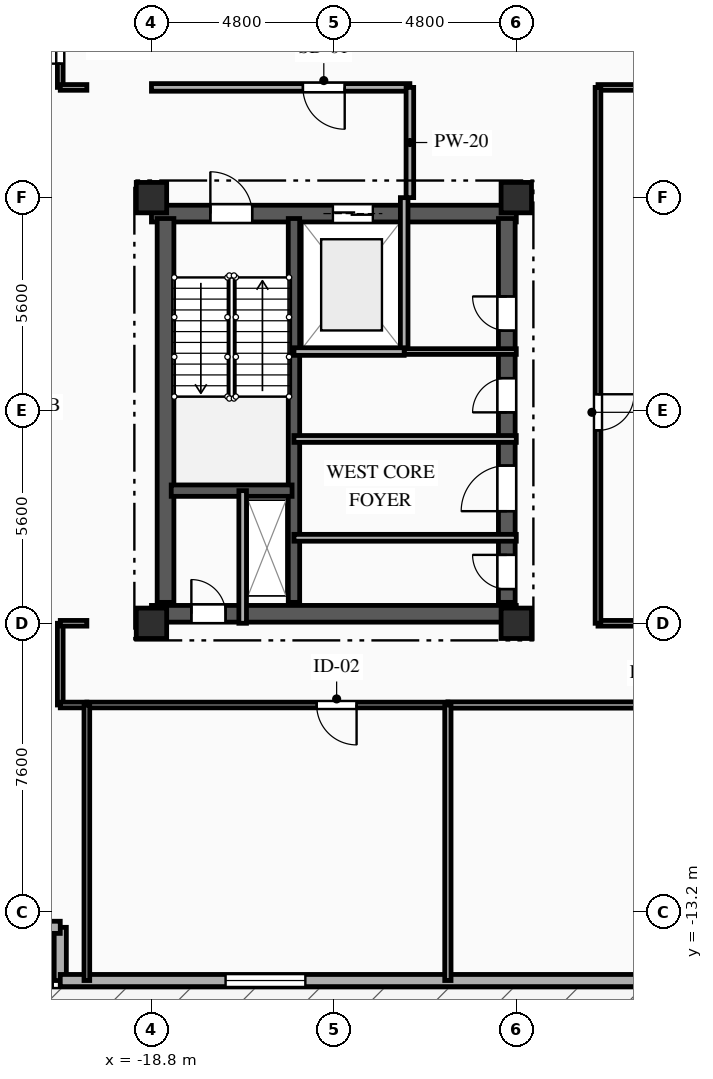
"""IFC4 building model, lengths in metres.
Left out: names, types, materials, properties, quantities, classifications, styles, units other than length and angle.
Written with IfcOpenShell. Run it as: python <this file> out.ifc"""

import sys

from ifc_helpers import new_model, si_unit, direction, frame, frame_2d, origin, origin_2d, place, context, subcontext, project, spatial, rectangle, extrude, element, fill, save


model = new_model("IFC4")
c1 = context("Model", 3, precision=1e-05, world=origin(), true_north=direction((0.0, 1.0)))
c2 = subcontext(c1, "Body", "Model", "MODEL_VIEW")
j1 = project(units=[si_unit("LENGTHUNIT", "METRE"), si_unit("PLANEANGLEUNIT", "RADIAN")], contexts=[c1])
p1 = place(None, origin())
s1 = spatial("IfcSite", under=j1, at=p1, CompositionType="ELEMENT")
p2 = place(p1, origin())
s2 = spatial("IfcBuilding", under=s1, at=p2, CompositionType="ELEMENT")
p3 = place(p2, frame((0.0, 0.0, 261.8)))
s3 = spatial("IfcBuildingStorey", under=s2, at=p3, CompositionType="ELEMENT", Elevation=261.8)
for number, where, z_axis, x_axis in (
    (1, (-18.8, -5.6, 0.0), (0.0, 0.0, 1.0), (1.0, 0.0, 0.0)),
    (2, (-18.8, 5.6, 0.0), (0.0, 0.0, 1.0), (1.0, 0.0, 0.0)),
    (3, (-9.2, -5.6, 0.0), (0.0, 0.0, 1.0), (1.0, 0.0, 0.0)),
    (4, (-9.2, 5.6, 0.0), (0.0, 0.0, 1.0), (1.0, 0.0, 0.0)),
):
    element("IfcColumn", number, at=place(p3, frame(where, z_axis=z_axis, x_axis=x_axis)), inside=s3, PredefinedType="COLUMN", context=c2, shape_type="SweptSolid", body=[
        extrude(rectangle(XDim=0.8, YDim=0.8, at=origin_2d()), origin(), (0.0, 0.0, 1.0), 4.2),
    ])
p4 = place(p3, frame((-21.2, -15.0, 0.0), z_axis=(0.0, 0.0, 1.0), x_axis=(0.0, 1.0, 0.0)))
e5 = element("IfcWall", 5, at=p4, inside=s3, PredefinedType="SOLIDWALL", context=c2, shape_type="SweptSolid", body=[
    extrude(rectangle(XDim=1.4, YDim=0.32, at=frame_2d((0.7, 0.0))), origin(), (0.0, 0.0, 1.0), 3.78),
])
p5 = place(p3, frame((-21.2, -13.6, 0.0), z_axis=(0.0, 0.0, 1.0), x_axis=(-1.0, 0.0, 0.0)))
e6 = element("IfcWall", 6, at=p5, inside=s3, PredefinedType="SOLIDWALL", context=c2, shape_type="SweptSolid", body=[
    extrude(rectangle(XDim=1.4, YDim=0.32, at=frame_2d((0.7, 0.0))), origin(), (0.0, 0.0, 1.0), 3.78),
])
p6 = place(p3, frame((20.8, -15.0, 0.0), z_axis=(0.0, 0.0, 1.0), x_axis=(-1.0, 0.0, 0.0)))
e7 = element("IfcWall", 7, at=p6, inside=s3, PredefinedType="SOLIDWALL", context=c2, shape_type="SweptSolid", body=[
    extrude(rectangle(XDim=42.0, YDim=0.32, at=frame_2d((21.0, 0.0))), origin(), (0.0, 0.0, 1.0), 3.78),
])
p7 = place(p6, frame((0.75, 0.0, 0.0)))
e8 = element("IfcOpeningElement", 8, at=p7, cuts=e7, PredefinedType="OPENING", context=c2, shape_type="SweptSolid", body=[
    extrude(rectangle(XDim=1.5, YDim=2.2, at=frame_2d((0.75, 1.1))), frame((0.0, 0.17, 0.0), z_axis=(0.0, -1.0, 0.0), x_axis=(1.0, 0.0, 0.0)), (0.0, 0.0, 1.0), 0.34),
])
p8 = place(p6, frame((4.11, 0.0, 0.75)))
e9 = element("IfcOpeningElement", 9, at=p8, cuts=e7, PredefinedType="OPENING", context=c2, shape_type="SweptSolid", body=[
    extrude(rectangle(XDim=2.1, YDim=2.3, at=frame_2d((1.05, 1.15))), frame((0.0, 0.17, 0.0), z_axis=(0.0, -1.0, 0.0), x_axis=(1.0, 0.0, 0.0)), (0.0, 0.0, 1.0), 0.34),
])
p9 = place(p6, frame((19.79, 0.0, 0.75)))
e10 = element("IfcOpeningElement", 10, at=p9, cuts=e7, PredefinedType="OPENING", context=c2, shape_type="SweptSolid", body=[
    extrude(rectangle(XDim=2.1, YDim=2.3, at=frame_2d((1.05, 1.15))), frame((0.0, 0.17, 0.0), z_axis=(0.0, -1.0, 0.0), x_axis=(1.0, 0.0, 0.0)), (0.0, 0.0, 1.0), 0.34),
])
p10 = place(p6, frame((35.55, 0.0, 0.75)))
e11 = element("IfcOpeningElement", 11, at=p10, cuts=e7, PredefinedType="OPENING", context=c2, shape_type="SweptSolid", body=[
    extrude(rectangle(XDim=2.1, YDim=2.3, at=frame_2d((1.05, 1.15))), frame((0.0, 0.17, 0.0), z_axis=(0.0, -1.0, 0.0), x_axis=(1.0, 0.0, 0.0)), (0.0, 0.0, 1.0), 0.34),
])
p11 = place(p3, frame((-18.8, 5.18, 0.0), z_axis=(0.0, 0.0, 1.0), x_axis=(1.0, 0.0, 0.0)))
e12 = element("IfcWall", 12, at=p11, inside=s3, PredefinedType="SHEAR", context=c2, shape_type="SweptSolid", body=[
    extrude(rectangle(XDim=9.6, YDim=0.44, at=frame_2d((4.8, 0.0))), origin(), (0.0, 0.0, 1.0), 3.78),
])
p12 = place(p11, frame((1.55, 0.0, 0.0)))
e13 = element("IfcOpeningElement", 13, at=p12, cuts=e12, PredefinedType="OPENING", context=c2, shape_type="SweptSolid", body=[
    extrude(rectangle(XDim=1.1, YDim=2.15, at=frame_2d((0.55, 1.075))), frame((0.0, 0.23, 0.0), z_axis=(0.0, -1.0, 0.0), x_axis=(1.0, 0.0, 0.0)), (0.0, 0.0, 1.0), 0.46),
])
p13 = place(p11, frame((4.775, 0.0, 0.0)))
e14 = element("IfcOpeningElement", 14, at=p13, cuts=e12, PredefinedType="OPENING", context=c2, shape_type="SweptSolid", body=[
    extrude(rectangle(XDim=1.05, YDim=2.1, at=frame_2d((0.525, 1.05))), frame((0.0, 0.23, 0.0), z_axis=(0.0, -1.0, 0.0), x_axis=(1.0, 0.0, 0.0)), (0.0, 0.0, 1.0), 0.46),
])
p14 = place(p3, frame((-18.8, -5.35, 0.0), z_axis=(0.0, 0.0, 1.0), x_axis=(1.0, 0.0, 0.0)))
e15 = element("IfcWall", 15, at=p14, inside=s3, PredefinedType="SHEAR", context=c2, shape_type="SweptSolid", body=[
    extrude(rectangle(XDim=9.6, YDim=0.44, at=frame_2d((4.8, 0.0))), origin(), (0.0, 0.0, 1.0), 3.78),
])
p15 = place(p14, frame((1.05, 0.0, 0.0)))
e16 = element("IfcOpeningElement", 16, at=p15, cuts=e15, PredefinedType="OPENING", context=c2, shape_type="SweptSolid", body=[
    extrude(rectangle(XDim=0.9, YDim=2.1, at=frame_2d((0.45, 1.05))), frame((0.0, 0.23, 0.0), z_axis=(0.0, -1.0, 0.0), x_axis=(1.0, 0.0, 0.0)), (0.0, 0.0, 1.0), 0.46),
])
p16 = place(p3, frame((-18.43, -5.05, 0.0), z_axis=(0.0, 0.0, 1.0), x_axis=(0.0, 1.0, 0.0)))
e17 = element("IfcWall", 17, at=p16, inside=s3, PredefinedType="SHEAR", context=c2, shape_type="SweptSolid", body=[
    extrude(rectangle(XDim=10.1, YDim=0.44, at=frame_2d((5.05, 0.0))), origin(), (0.0, 0.0, 1.0), 3.78),
])
p17 = place(p3, frame((-9.45, -5.05, 0.0), z_axis=(0.0, 0.0, 1.0), x_axis=(0.0, 1.0, 0.0)))
e18 = element("IfcWall", 18, at=p17, inside=s3, PredefinedType="SHEAR", context=c2, shape_type="SweptSolid", body=[
    extrude(rectangle(XDim=10.1, YDim=0.44, at=frame_2d((5.05, 0.0))), origin(), (0.0, 0.0, 1.0), 3.78),
])
p18 = place(p17, frame((7.15, 0.0, 0.0)))
e19 = element("IfcOpeningElement", 19, at=p18, cuts=e18, PredefinedType="OPENING", context=c2, shape_type="SweptSolid", body=[
    extrude(rectangle(XDim=0.9, YDim=2.1, at=frame_2d((0.45, 1.05))), frame((0.0, 0.23, 0.0), z_axis=(0.0, -1.0, 0.0), x_axis=(1.0, 0.0, 0.0)), (0.0, 0.0, 1.0), 0.46),
])
p19 = place(p17, frame((2.4, 0.0, 0.0)))
e20 = element("IfcOpeningElement", 20, at=p19, cuts=e18, PredefinedType="OPENING", context=c2, shape_type="SweptSolid", body=[
    extrude(rectangle(XDim=1.2, YDim=2.15, at=frame_2d((0.6, 1.075))), frame((0.0, 0.23, 0.0), z_axis=(0.0, -1.0, 0.0), x_axis=(1.0, 0.0, 0.0)), (0.0, 0.0, 1.0), 0.46),
])
p20 = place(p17, frame((0.35, 0.0, 0.0)))
e21 = element("IfcOpeningElement", 21, at=p20, cuts=e18, PredefinedType="OPENING", context=c2, shape_type="SweptSolid", body=[
    extrude(rectangle(XDim=0.9, YDim=2.1, at=frame_2d((0.45, 1.05))), frame((0.0, 0.23, 0.0), z_axis=(0.0, -1.0, 0.0), x_axis=(1.0, 0.0, 0.0)), (0.0, 0.0, 1.0), 0.46),
])
p21 = place(p17, frame((5.0, 0.0, 0.0)))
e22 = element("IfcOpeningElement", 22, at=p21, cuts=e18, PredefinedType="OPENING", context=c2, shape_type="SweptSolid", body=[
    extrude(rectangle(XDim=0.9, YDim=2.1, at=frame_2d((0.45, 1.05))), frame((0.0, 0.23, 0.0), z_axis=(0.0, -1.0, 0.0), x_axis=(1.0, 0.0, 0.0)), (0.0, 0.0, 1.0), 0.46),
])
p22 = place(p3, frame((-15.05, -5.05, 0.0), z_axis=(0.0, 0.0, 1.0), x_axis=(0.0, 1.0, 0.0)))
e23 = element("IfcWall", 23, at=p22, inside=s3, PredefinedType="SHEAR", context=c2, shape_type="SweptSolid", body=[
    extrude(rectangle(XDim=10.1, YDim=0.3, at=frame_2d((5.05, 0.0))), origin(), (0.0, 0.0, 1.0), 3.78),
])
p23 = place(p3, frame((-18.28, -2.11, 0.0), z_axis=(0.0, 0.0, 1.0), x_axis=(1.0, 0.0, 0.0)))
e24 = element("IfcWall", 24, at=p23, inside=s3, PredefinedType="SHEAR", context=c2, shape_type="SweptSolid", body=[
    extrude(rectangle(XDim=3.18, YDim=0.3, at=frame_2d((1.59, 0.0))), origin(), (0.0, 0.0, 1.0), 3.78),
])
p24 = place(p3, frame((-16.4, -5.6, 0.0), z_axis=(0.0, 0.0, 1.0), x_axis=(0.0, 1.0, 0.0)))
e25 = element("IfcWall", 25, at=p24, inside=s3, PredefinedType="PARTITIONING", context=c2, shape_type="SweptSolid", body=[
    extrude(rectangle(XDim=3.49, YDim=0.2, at=frame_2d((1.745, 0.0))), origin(), (0.0, 0.0, 1.0), 3.78),
])
p25 = place(p3, frame((-12.15, 1.55, 0.0), z_axis=(0.0, 0.0, 1.0), x_axis=(0.0, 1.0, 0.0)))
e26 = element("IfcWall", 26, at=p25, inside=s3, PredefinedType="PARTITIONING", context=c2, shape_type="SweptSolid", body=[
    extrude(rectangle(XDim=4.05, YDim=0.2, at=frame_2d((2.025, 0.0))), origin(), (0.0, 0.0, 1.0), 3.78),
])
p26 = place(p3, frame((-12.0, 8.5, 0.0), z_axis=(0.0, 0.0, 1.0), x_axis=(-1.0, 0.0, 0.0)))
e27 = element("IfcWall", 27, at=p26, inside=s3, PredefinedType="PARTITIONING", context=c2, shape_type="SweptSolid", body=[
    extrude(rectangle(XDim=6.8, YDim=0.2, at=frame_2d((3.4, 0.0))), origin(), (0.0, 0.0, 1.0), 3.78),
])
p27 = place(p26, frame((1.715, 0.0, 0.0)))
e28 = element("IfcOpeningElement", 28, at=p27, cuts=e27, PredefinedType="OPENING", context=c2, shape_type="SweptSolid", body=[
    extrude(rectangle(XDim=1.1, YDim=2.15, at=frame_2d((0.55, 1.075))), frame((0.0, 0.11, 0.0), z_axis=(0.0, -1.0, 0.0), x_axis=(1.0, 0.0, 0.0)), (0.0, 0.0, 1.0), 0.22),
])
p28 = place(p3, frame((-12.0, 5.6, 0.0), z_axis=(0.0, 0.0, 1.0), x_axis=(0.0, 1.0, 0.0)))
e29 = element("IfcWall", 29, at=p28, inside=s3, PredefinedType="PARTITIONING", context=c2, shape_type="SweptSolid", body=[
    extrude(rectangle(XDim=2.9, YDim=0.2, at=frame_2d((1.45, 0.0))), origin(), (0.0, 0.0, 1.0), 3.78),
])
p29 = place(p3, frame((-12.15, 1.55, 0.0), z_axis=(0.0, 0.0, 1.0), x_axis=(1.0, 0.0, 0.0)))
e30 = element("IfcWall", 30, at=p29, inside=s3, PredefinedType="PARTITIONING", context=c2, shape_type="SweptSolid", body=[
    extrude(rectangle(XDim=2.95, YDim=0.15, at=frame_2d((1.475, 0.0))), origin(), (0.0, 0.0, 1.0), 3.78),
])
p30 = place(p3, frame((-15.05, -3.35, 0.0), z_axis=(0.0, 0.0, 1.0), x_axis=(1.0, 0.0, 0.0)))
e31 = element("IfcWall", 31, at=p30, inside=s3, PredefinedType="PARTITIONING", context=c2, shape_type="SweptSolid", body=[
    extrude(rectangle(XDim=5.85, YDim=0.18, at=frame_2d((2.925, 0.0))), origin(), (0.0, 0.0, 1.0), 3.495),
])
p31 = place(p3, frame((-9.2, -0.75, 0.0), z_axis=(0.0, 0.0, 1.0), x_axis=(-1.0, 0.0, 0.0)))
e32 = element("IfcWall", 32, at=p31, inside=s3, PredefinedType="PARTITIONING", context=c2, shape_type="SweptSolid", body=[
    extrude(rectangle(XDim=5.85, YDim=0.18, at=frame_2d((2.925, 0.0))), origin(), (0.0, 0.0, 1.0), 3.78),
])
p32 = place(p3, frame((-21.2, 8.5, 0.0), z_axis=(0.0, 0.0, 1.0), x_axis=(0.0, 1.0, 0.0)))
e33 = element("IfcWall", 33, at=p32, inside=s3, PredefinedType="PARTITIONING", context=c2, shape_type="SweptSolid", body=[
    extrude(rectangle(XDim=2.15, YDim=0.15, at=frame_2d((1.075, 0.0))), origin(), (0.0, 0.0, 1.0), 3.435),
])
p33 = place(p32, frame((0.625, 0.0, 0.0)))
e34 = element("IfcOpeningElement", 34, at=p33, cuts=e33, PredefinedType="OPENING", context=c2, shape_type="SweptSolid", body=[
    extrude(rectangle(XDim=0.9, YDim=2.1, at=frame_2d((0.45, 1.05))), frame((0.0, 0.085, 0.0), z_axis=(0.0, -1.0, 0.0), x_axis=(1.0, 0.0, 0.0)), (0.0, 0.0, 1.0), 0.17),
])
p34 = place(p3, frame((-20.5, 8.5, 0.0), z_axis=(0.0, 0.0, 1.0), x_axis=(-1.0, 0.0, 0.0)))
e35 = element("IfcWall", 35, at=p34, inside=s3, PredefinedType="PARTITIONING", context=c2, shape_type="SweptSolid", body=[
    extrude(rectangle(XDim=0.7, YDim=0.15, at=frame_2d((0.35, 0.0))), origin(), (0.0, 0.0, 1.0), 3.78),
])
p35 = place(p3, frame((0.0, 8.5, 0.0), z_axis=(0.0, 0.0, 1.0), x_axis=(-1.0, 0.0, 0.0)))
e36 = element("IfcWall", 36, at=p35, inside=s3, PredefinedType="PARTITIONING", context=c2, shape_type="SweptSolid", body=[
    extrude(rectangle(XDim=7.05, YDim=0.15, at=frame_2d((3.525, 0.0))), origin(), (0.0, 0.0, 1.0), 3.78),
])
p36 = place(p3, frame((0.0, -7.75, 0.0), z_axis=(0.0, 0.0, 1.0), x_axis=(-1.0, 0.0, 0.0)))
e37 = element("IfcWall", 37, at=p36, inside=s3, PredefinedType="PARTITIONING", context=c2, shape_type="SweptSolid", body=[
    extrude(rectangle(XDim=11.0, YDim=0.165, at=frame_2d((5.5, 0.0))), origin(), (0.0, 0.0, 1.0), 3.78),
])
p37 = place(p36, frame((1.679, 0.0, 0.0)))
e38 = element("IfcOpeningElement", 38, at=p37, cuts=e37, PredefinedType="OPENING", context=c2, shape_type="SweptSolid", body=[
    extrude(rectangle(XDim=1.05, YDim=2.15, at=frame_2d((0.525, 1.075))), frame((0.0, 0.093, 0.0), z_axis=(0.0, -1.0, 0.0), x_axis=(1.0, 0.0, 0.0)), (0.0, 0.0, 1.0), 0.185),
])
p38 = place(p3, frame((-11.0, -7.75, 0.0), z_axis=(0.0, 0.0, 1.0), x_axis=(-1.0, 0.0, 0.0)))
e39 = element("IfcWall", 39, at=p38, inside=s3, PredefinedType="PARTITIONING", context=c2, shape_type="SweptSolid", body=[
    extrude(rectangle(XDim=9.5, YDim=0.15, at=frame_2d((4.75, 0.0))), origin(), (0.0, 0.0, 1.0), 3.78),
])
p39 = place(p38, frame((2.403, 0.0, 0.0)))
e40 = element("IfcOpeningElement", 40, at=p39, cuts=e39, PredefinedType="OPENING", context=c2, shape_type="SweptSolid", body=[
    extrude(rectangle(XDim=1.05, YDim=2.15, at=frame_2d((0.525, 1.075))), frame((0.0, 0.085, 0.0), z_axis=(0.0, -1.0, 0.0), x_axis=(1.0, 0.0, 0.0)), (0.0, 0.0, 1.0), 0.17),
])
p40 = place(p3, frame((-21.2, -7.75, 0.0), z_axis=(0.0, 0.0, 1.0), x_axis=(0.0, 1.0, 0.0)))
e41 = element("IfcWall", 41, at=p40, inside=s3, PredefinedType="PARTITIONING", context=c2, shape_type="SweptSolid", body=[
    extrude(rectangle(XDim=2.15, YDim=0.15, at=frame_2d((1.075, 0.0))), origin(), (0.0, 0.0, 1.0), 3.435),
])
for number, where, z_axis, x_axis in (
    (42, (-20.5, -7.75, 0.0), (0.0, 0.0, 1.0), (-1.0, 0.0, 0.0)),
    (43, (-21.2, -5.6, 0.0), (0.0, 0.0, 1.0), (1.0, 0.0, 0.0)),
):
    element("IfcWall", number, at=place(p3, frame(where, z_axis=z_axis, x_axis=x_axis)), inside=s3, PredefinedType="PARTITIONING", context=c2, shape_type="SweptSolid", body=[
        extrude(rectangle(XDim=0.7, YDim=0.15, at=frame_2d((0.35, 0.0))), origin(), (0.0, 0.0, 1.0), 3.78),
    ])
p41 = place(p3, frame((-7.05, -5.6, 0.0), z_axis=(0.0, 0.0, 1.0), x_axis=(1.0, 0.0, 0.0)))
e44 = element("IfcWall", 44, at=p41, inside=s3, PredefinedType="PARTITIONING", context=c2, shape_type="SweptSolid", body=[
    extrude(rectangle(XDim=7.05, YDim=0.15, at=frame_2d((3.525, 0.0))), origin(), (0.0, 0.0, 1.0), 3.265),
])
p42 = place(p3, frame((-7.05, 8.5, 0.0), z_axis=(0.0, 0.0, 1.0), x_axis=(0.0, -1.0, 0.0)))
e45 = element("IfcWall", 45, at=p42, inside=s3, PredefinedType="PARTITIONING", context=c2, shape_type="SweptSolid", body=[
    extrude(rectangle(XDim=14.1, YDim=0.15, at=frame_2d((7.05, 0.0))), origin(), (0.0, 0.0, 1.0), 3.78),
])
p43 = place(p42, frame((8.074, 0.0, 0.0)))
e46 = element("IfcOpeningElement", 46, at=p43, cuts=e45, PredefinedType="OPENING", context=c2, shape_type="SweptSolid", body=[
    extrude(rectangle(XDim=0.95, YDim=2.1, at=frame_2d((0.475, 1.05))), frame((0.0, 0.085, 0.0), z_axis=(0.0, -1.0, 0.0), x_axis=(1.0, 0.0, 0.0)), (0.0, 0.0, 1.0), 0.17),
])
p44 = place(p3, frame((-11.0, -15.0, 0.0), z_axis=(0.0, 0.0, 1.0), x_axis=(0.0, 1.0, 0.0)))
e47 = element("IfcWall", 47, at=p44, inside=s3, PredefinedType="PARTITIONING", context=c2, shape_type="SweptSolid", body=[
    extrude(rectangle(XDim=7.25, YDim=0.165, at=frame_2d((3.625, 0.0))), origin(), (0.0, 0.0, 1.0), 3.78),
])
p45 = place(p3, frame((-20.5, -15.0, 0.0), z_axis=(0.0, 0.0, 1.0), x_axis=(0.0, 1.0, 0.0)))
e48 = element("IfcWall", 48, at=p45, inside=s3, PredefinedType="PARTITIONING", context=c2, shape_type="SweptSolid", body=[
    extrude(rectangle(XDim=7.25, YDim=0.15, at=frame_2d((3.625, 0.0))), origin(), (0.0, 0.0, 1.0), 3.78),
])
p46 = place(p3, frame((-15.05, 1.55, 0.0), z_axis=(0.0, 0.0, 1.0), x_axis=(1.0, 0.0, 0.0)))
e49 = element("IfcWall", 49, at=p46, inside=s3, PredefinedType="PARTITIONING", context=c2, shape_type="SweptSolid", body=[
    extrude(rectangle(XDim=2.9, YDim=0.2, at=frame_2d((1.45, 0.0))), origin(), (0.0, 0.0, 1.0), 3.78),
])
p47 = place(p10, origin())
e50 = element("IfcWindow", 50, at=p47, inside=s3, PartitioningType="SINGLE_PANEL", PredefinedType="WINDOW", context=c2, shape_type="SweptSolid", body=[
    extrude(rectangle(XDim=2.1, YDim=2.3, at=frame_2d((1.05, 1.15))), frame((0.0, 0.03, 0.0), z_axis=(0.0, -1.0, 0.0), x_axis=(1.0, 0.0, 0.0)), (0.0, 0.0, 1.0), 0.06),
])
fill(e11, e50)
p48 = place(p12, origin())
e51 = element("IfcDoor", 51, at=p48, inside=s3, OperationType="SINGLE_SWING_LEFT", PredefinedType="DOOR", context=c2, shape_type="SweptSolid", body=[
    extrude(rectangle(XDim=1.1, YDim=2.15, at=frame_2d((0.55, 1.075))), frame((0.0, 0.025, 0.0), z_axis=(0.0, -1.0, 0.0), x_axis=(1.0, 0.0, 0.0)), (0.0, 0.0, 1.0), 0.05),
])
fill(e13, e51)
p49 = place(p13, origin())
e52 = element("IfcDoor", 52, at=p49, inside=s3, OperationType="DOUBLE_DOOR_SLIDING", PredefinedType="DOOR", context=c2, shape_type="SweptSolid", body=[
    extrude(rectangle(XDim=1.05, YDim=2.1, at=frame_2d((0.525, 1.05))), frame((0.0, 0.025, 0.0), z_axis=(0.0, -1.0, 0.0), x_axis=(1.0, 0.0, 0.0)), (0.0, 0.0, 1.0), 0.05),
])
fill(e14, e52)
p50 = place(p15, origin())
e53 = element("IfcDoor", 53, at=p50, inside=s3, OperationType="SINGLE_SWING_LEFT", PredefinedType="DOOR", context=c2, shape_type="SweptSolid", body=[
    extrude(rectangle(XDim=0.9, YDim=2.1, at=frame_2d((0.45, 1.05))), frame((0.0, 0.025, 0.0), z_axis=(0.0, -1.0, 0.0), x_axis=(1.0, 0.0, 0.0)), (0.0, 0.0, 1.0), 0.05),
])
fill(e16, e53)
p51 = place(p27, origin())
e54 = element("IfcDoor", 54, at=p51, inside=s3, OperationType="SINGLE_SWING_LEFT", PredefinedType="DOOR", context=c2, shape_type="SweptSolid", body=[
    extrude(rectangle(XDim=1.1, YDim=2.15, at=frame_2d((0.55, 1.075))), frame((0.0, 0.025, 0.0), z_axis=(0.0, -1.0, 0.0), x_axis=(1.0, 0.0, 0.0)), (0.0, 0.0, 1.0), 0.05),
])
fill(e28, e54)
p52 = place(p18, origin())
e55 = element("IfcDoor", 55, at=p52, inside=s3, OperationType="SINGLE_SWING_RIGHT", PredefinedType="DOOR", context=c2, shape_type="SweptSolid", body=[
    extrude(rectangle(XDim=0.9, YDim=2.1, at=frame_2d((0.45, 1.05))), frame((0.0, 0.025, 0.0), z_axis=(0.0, -1.0, 0.0), x_axis=(1.0, 0.0, 0.0)), (0.0, 0.0, 1.0), 0.05),
])
fill(e19, e55)
p53 = place(p19, origin())
e56 = element("IfcDoor", 56, at=p53, inside=s3, OperationType="SINGLE_SWING_LEFT", PredefinedType="DOOR", context=c2, shape_type="SweptSolid", body=[
    extrude(rectangle(XDim=1.2, YDim=2.15, at=frame_2d((0.6, 1.075))), frame((0.0, 0.025, 0.0), z_axis=(0.0, -1.0, 0.0), x_axis=(1.0, 0.0, 0.0)), (0.0, 0.0, 1.0), 0.05),
])
fill(e20, e56)
p54 = place(p20, origin())
e57 = element("IfcDoor", 57, at=p54, inside=s3, OperationType="SINGLE_SWING_RIGHT", PredefinedType="DOOR", context=c2, shape_type="SweptSolid", body=[
    extrude(rectangle(XDim=0.9, YDim=2.1, at=frame_2d((0.45, 1.05))), frame((0.0, 0.025, 0.0), z_axis=(0.0, -1.0, 0.0), x_axis=(1.0, 0.0, 0.0)), (0.0, 0.0, 1.0), 0.05),
])
fill(e21, e57)
p55 = place(p21, origin())
e58 = element("IfcDoor", 58, at=p55, inside=s3, OperationType="SINGLE_SWING_LEFT", PredefinedType="DOOR", context=c2, shape_type="SweptSolid", body=[
    extrude(rectangle(XDim=0.9, YDim=2.1, at=frame_2d((0.45, 1.05))), frame((0.0, 0.025, 0.0), z_axis=(0.0, -1.0, 0.0), x_axis=(1.0, 0.0, 0.0)), (0.0, 0.0, 1.0), 0.05),
])
fill(e22, e58)
p56 = place(p33, origin())
e59 = element("IfcDoor", 59, at=p56, inside=s3, OperationType="SINGLE_SWING_LEFT", PredefinedType="DOOR", context=c2, shape_type="SweptSolid", body=[
    extrude(rectangle(XDim=0.9, YDim=2.1, at=frame_2d((0.45, 1.05))), frame((0.0, 0.025, 0.0), z_axis=(0.0, -1.0, 0.0), x_axis=(1.0, 0.0, 0.0)), (0.0, 0.0, 1.0), 0.05),
])
fill(e34, e59)
p57 = place(p39, origin())
e60 = element("IfcDoor", 60, at=p57, inside=s3, OperationType="SINGLE_SWING_LEFT", PredefinedType="DOOR", context=c2, shape_type="SweptSolid", body=[
    extrude(rectangle(XDim=1.05, YDim=2.15, at=frame_2d((0.525, 1.075))), frame((0.0, 0.025, 0.0), z_axis=(0.0, -1.0, 0.0), x_axis=(1.0, 0.0, 0.0)), (0.0, 0.0, 1.0), 0.05),
])
fill(e40, e60)
p58 = place(p43, origin())
e61 = element("IfcDoor", 61, at=p58, inside=s3, OperationType="SINGLE_SWING_LEFT", PredefinedType="DOOR", context=c2, shape_type="SweptSolid", body=[
    extrude(rectangle(XDim=0.95, YDim=2.1, at=frame_2d((0.475, 1.05))), frame((0.0, 0.025, 0.0), z_axis=(0.0, -1.0, 0.0), x_axis=(1.0, 0.0, 0.0)), (0.0, 0.0, 1.0), 0.05),
])
fill(e46, e61)
save(model, sys.argv[1])
